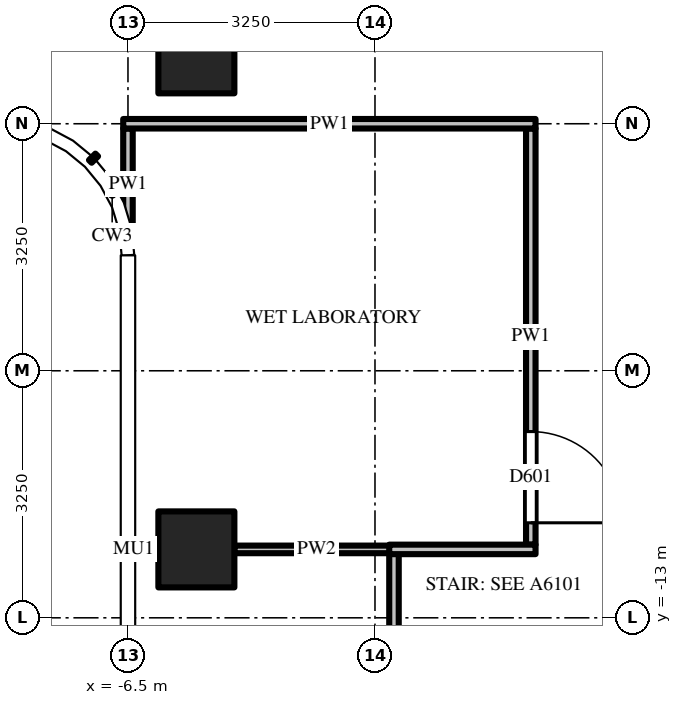
"""IFC4 building model, lengths in metres.
Left out: names, types, materials, properties, quantities, classifications, styles, units other than length and angle.
Written with IfcOpenShell. Run it as: python <this file> out.ifc"""

import sys

from ifc_helpers import new_model, si_unit, direction, frame, frame_2d, origin, origin_2d, place, context, subcontext, project, spatial, rectangle, extrude, source, transform, mapped, element, fill, save


model = new_model("IFC4")
c1 = context("Model", 3, precision=1e-05, world=origin(), true_north=direction((0.0, 1.0)))
c2 = subcontext(c1, "Body", "Model", "MODEL_VIEW")
j1 = project(units=[si_unit("LENGTHUNIT", "METRE"), si_unit("PLANEANGLEUNIT", "RADIAN")], contexts=[c1])
p1 = place(None, origin())
s1 = spatial("IfcSite", under=j1, at=p1, CompositionType="ELEMENT")
p2 = place(p1, origin())
s2 = spatial("IfcBuilding", under=s1, at=p2, CompositionType="ELEMENT")
p3 = place(p2, frame((0.0, 0.0, 291.1)))
s3 = spatial("IfcBuildingStorey", under=s2, at=p3, CompositionType="ELEMENT", Elevation=291.1)
m1 = source(origin(), c2, "Body", "SweptSolid", [
    extrude(rectangle(XDim=1.0, YDim=1.0, at=origin_2d()), origin(), (0.0, 0.0, 1.0), 3.9),
])
for number, where, z_axis, x_axis in (
    (1, (-5.6, -5.6, 0.0), (0.0, 0.0, 1.0), (1.0, 0.0, 0.0)),
    (2, (-5.6, -12.1, 0.0), (0.0, 0.0, 1.0), (1.0, 0.0, 0.0)),
):
    element("IfcColumn", number, at=place(p3, frame(where, z_axis=z_axis, x_axis=x_axis)), inside=s3, PredefinedType="COLUMN", context=c2, shape_type="MappedRepresentation", body=[
        mapped(m1, transform((0.0, 0.0, 0.0))),
    ])
m2 = source(origin(), c2, "Body", "SweptSolid", [
    extrude(rectangle(XDim=1.469, YDim=0.125, at=frame_2d((0.734, 0.0))), origin(), (0.0, 0.0, 1.0), 3.7),
])
p4 = place(p3, frame((-6.5, -6.562, 0.0), z_axis=(0.0, 0.0, 1.0), x_axis=(0.0, -1.0, 0.0)))
e3 = element("IfcWall", 3, at=p4, inside=s3, PredefinedType="PARTITIONING", context=c2, shape_type="MappedRepresentation", body=[
    mapped(m2, transform((0.0, 0.0, 0.0))),
])
m3 = source(origin(), c2, "Body", "SweptSolid", [
    extrude(rectangle(XDim=8.788, YDim=0.125, at=frame_2d((4.394, 0.0))), origin(), (0.0, 0.0, 1.0), 2.78),
])
p5 = place(p3, frame((-3.0, -20.938, 0.0), z_axis=(0.0, 0.0, 1.0), x_axis=(0.0, 1.0, 0.0)))
e4 = element("IfcWall", 4, at=p5, inside=s3, PredefinedType="PARTITIONING", context=c2, shape_type="MappedRepresentation", body=[
    mapped(m3, transform((0.0, 0.0, 0.0))),
])
m4 = source(origin(), c2, "Body", "SweptSolid", [
    extrude(rectangle(XDim=1.8, YDim=2.1, at=frame_2d((0.9, 1.05))), frame((0.0, 0.073, 0.0), z_axis=(0.0, -1.0, 0.0), x_axis=(1.0, 0.0, 0.0)), (0.0, 0.0, 1.0), 0.145),
])
p6 = place(p5, frame((5.288, 0.0, 0.0)))
e5 = element("IfcOpeningElement", 5, at=p6, cuts=e4, PredefinedType="OPENING", context=c2, shape_type="MappedRepresentation", body=[
    mapped(m4, transform((0.0, 0.0, 0.0))),
])
m5 = source(origin(), c2, "Body", "SweptSolid", [
    extrude(rectangle(XDim=5.475, YDim=0.125, at=frame_2d((2.738, 0.0))), origin(), (0.0, 0.0, 1.0), 2.997),
])
p7 = place(p3, frame((-1.2, -6.562, 0.0), z_axis=(0.0, 0.0, 1.0), x_axis=(0.0, -1.0, 0.0)))
e6 = element("IfcWall", 6, at=p7, inside=s3, PredefinedType="PARTITIONING", context=c2, shape_type="MappedRepresentation", body=[
    mapped(m5, transform((0.0, 0.0, 0.0))),
])
m6 = source(origin(), c2, "Body", "SweptSolid", [
    extrude(rectangle(XDim=1.2, YDim=2.1, at=frame_2d((0.6, 1.05))), frame((0.0, 0.073, 0.0), z_axis=(0.0, -1.0, 0.0), x_axis=(1.0, 0.0, 0.0)), (0.0, 0.0, 1.0), 0.145),
])
p8 = place(p7, frame((3.988, 0.0, 0.0)))
e7 = element("IfcOpeningElement", 7, at=p8, cuts=e6, PredefinedType="OPENING", context=c2, shape_type="MappedRepresentation", body=[
    mapped(m6, transform((0.0, 0.0, 0.0))),
])
m7 = source(origin(), c2, "Body", "SweptSolid", [
    extrude(rectangle(XDim=2.163, YDim=0.1, at=frame_2d((1.081, 0.0))), origin(), (0.0, 0.0, 1.0), 2.997),
])
p9 = place(p3, frame((-5.1, -12.1, 0.0), z_axis=(0.0, 0.0, 1.0), x_axis=(1.0, 0.0, 0.0)))
e8 = element("IfcWall", 8, at=p9, inside=s3, PredefinedType="PARTITIONING", context=c2, shape_type="MappedRepresentation", body=[
    mapped(m7, transform((0.0, 0.0, 0.0))),
])
m8 = source(origin(), c2, "Body", "SweptSolid", [
    extrude(rectangle(XDim=1.925, YDim=0.125, at=frame_2d((0.962, 0.0))), origin(), (0.0, 0.0, 1.0), 2.997),
])
p10 = place(p3, frame((-3.062, -12.1, 0.0), z_axis=(0.0, 0.0, 1.0), x_axis=(1.0, 0.0, 0.0)))
e9 = element("IfcWall", 9, at=p10, inside=s3, PredefinedType="PARTITIONING", context=c2, shape_type="MappedRepresentation", body=[
    mapped(m8, transform((0.0, 0.0, 0.0))),
])
m9 = source(origin(), c2, "Body", "SweptSolid", [
    extrude(rectangle(XDim=5.425, YDim=0.125, at=frame_2d((2.712, 0.0))), origin(), (0.0, 0.0, 1.0), 2.78),
])
p11 = place(p3, frame((-1.137, -6.5, 0.0), z_axis=(0.0, 0.0, 1.0), x_axis=(-1.0, 0.0, 0.0)))
e10 = element("IfcWall", 10, at=p11, inside=s3, PredefinedType="PARTITIONING", context=c2, shape_type="MappedRepresentation", body=[
    mapped(m9, transform((0.0, 0.0, 0.0))),
])
m10 = source(origin(), c2, "Body", "SweptSolid", [
    extrude(rectangle(XDim=1.2, YDim=2.1, at=frame_2d((0.6, 1.05))), frame((0.0, 0.025, 0.0), z_axis=(0.0, -1.0, 0.0), x_axis=(1.0, 0.0, 0.0)), (0.0, 0.0, 1.0), 0.05),
])
p12 = place(p8, origin())
e11 = element("IfcDoor", 11, at=p12, inside=s3, OperationType="SINGLE_SWING_RIGHT", PredefinedType="DOOR", context=c2, shape_type="MappedRepresentation", body=[
    mapped(m10, transform((0.0, 0.0, 0.0))),
])
fill(e7, e11)
save(model, sys.argv[1])
